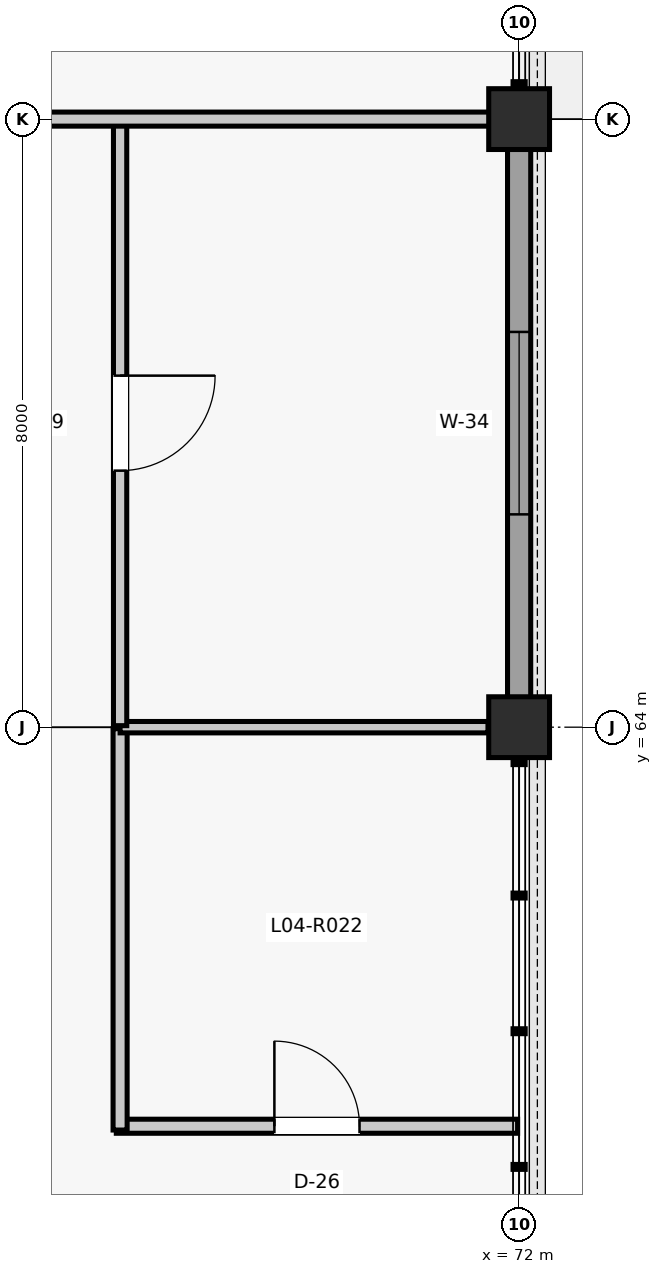
"""IFC4 building model, lengths in metres.
Left out: names, types, materials, properties, quantities, classifications, styles, units other than length and angle.
Written with IfcOpenShell. Run it as: python <this file> out.ifc"""

import sys

from ifc_helpers import new_model, si_unit, direction, frame, frame_2d, origin, origin_2d, place, context, subcontext, project, spatial, rectangle, extrude, element, fill, save


model = new_model("IFC4")
c1 = context("Model", 3, precision=1e-05, world=origin(), true_north=direction((0.0, 1.0)))
c2 = subcontext(c1, "Body", "Model", "MODEL_VIEW")
j1 = project(units=[si_unit("LENGTHUNIT", "METRE"), si_unit("PLANEANGLEUNIT", "RADIAN")], contexts=[c1])
p1 = place(None, origin())
s1 = spatial("IfcSite", under=j1, at=p1, CompositionType="ELEMENT")
p2 = place(p1, origin())
s2 = spatial("IfcBuilding", under=s1, at=p2, CompositionType="ELEMENT")
p3 = place(p2, frame((0.0, 0.0, 17.82)))
s3 = spatial("IfcBuildingStorey", under=s2, at=p3, CompositionType="ELEMENT", Elevation=17.82)
for number, where, z_axis, x_axis in (
    (1, (72.0, 64.0, 0.0), (0.0, 0.0, 1.0), (1.0, 0.0, 0.0)),
    (2, (72.0, 72.0, 0.0), (0.0, 0.0, 1.0), (1.0, 0.0, 0.0)),
):
    element("IfcColumn", number, at=place(p3, frame(where, z_axis=z_axis, x_axis=x_axis)), inside=s3, PredefinedType="COLUMN", context=c2, shape_type="SweptSolid", body=[
        extrude(rectangle(XDim=0.8, YDim=0.8, at=origin_2d()), origin(), (0.0, 0.0, 1.0), 3.96),
    ])
p4 = place(p3, frame((72.0, 64.385, 0.0), z_axis=(0.0, 0.0, 1.0), x_axis=(0.0, 1.0, 0.0)))
e3 = element("IfcWall", 3, at=p4, inside=s3, PredefinedType="SOLIDWALL", context=c2, shape_type="SweptSolid", body=[
    extrude(rectangle(XDim=7.23, YDim=0.305, at=frame_2d((3.615, 0.0))), origin(), (0.0, 0.0, 1.0), 3.002),
])
p5 = place(p4, frame((2.415, 0.0, 0.9)))
e4 = element("IfcOpeningElement", 4, at=p5, cuts=e3, PredefinedType="OPENING", context=c2, shape_type="SweptSolid", body=[
    extrude(rectangle(XDim=2.4, YDim=1.902, at=frame_2d((1.2, 0.951))), frame((0.0, 0.162, 0.0), z_axis=(0.0, -1.0, 0.0), x_axis=(1.0, 0.0, 0.0)), (0.0, 0.0, 1.0), 0.325),
])
p6 = place(p3, frame((66.7, 58.75, 0.0), z_axis=(0.0, 0.0, 1.0), x_axis=(1.0, 0.0, 0.0)))
e5 = element("IfcWall", 5, at=p6, inside=s3, PredefinedType="PARTITIONING", context=c2, shape_type="SweptSolid", body=[
    extrude(rectangle(XDim=5.28, YDim=0.185, at=frame_2d((2.64, 0.0))), origin(), (0.0, 0.0, 1.0), 2.995),
])
p7 = place(p6, frame((2.08, 0.0, 0.0)))
e6 = element("IfcOpeningElement", 6, at=p7, cuts=e5, PredefinedType="OPENING", context=c2, shape_type="SweptSolid", body=[
    extrude(rectangle(XDim=1.12, YDim=2.22, at=frame_2d((0.56, 1.11))), frame((0.0, 0.103, 0.0), z_axis=(0.0, -1.0, 0.0), x_axis=(1.0, 0.0, 0.0)), (0.0, 0.0, 1.0), 0.205),
])
p8 = place(p3, frame((66.75, 58.7, 0.0), z_axis=(0.0, 0.0, 1.0), x_axis=(0.0, 1.0, 0.0)))
e7 = element("IfcWall", 7, at=p8, inside=s3, PredefinedType="PARTITIONING", context=c2, shape_type="SweptSolid", body=[
    extrude(rectangle(XDim=5.28, YDim=0.185, at=frame_2d((2.64, 0.0))), origin(), (0.0, 0.0, 1.0), 3.232),
])
p9 = place(p3, frame((66.75, 64.0, 0.0), z_axis=(0.0, 0.0, 1.0), x_axis=(1.0, 0.0, 0.0)))
e8 = element("IfcWall", 8, at=p9, inside=s3, PredefinedType="PARTITIONING", context=c2, shape_type="SweptSolid", body=[
    extrude(rectangle(XDim=4.84, YDim=0.15, at=frame_2d((2.42, 0.0))), origin(), (0.0, 0.0, 1.0), 3.232),
])
p10 = place(p3, frame((66.75, 64.02, 0.0), z_axis=(0.0, 0.0, 1.0), x_axis=(0.0, 1.0, 0.0)))
e9 = element("IfcWall", 9, at=p10, inside=s3, PredefinedType="PARTITIONING", context=c2, shape_type="SweptSolid", body=[
    extrude(rectangle(XDim=7.96, YDim=0.175, at=frame_2d((3.98, 0.0))), origin(), (0.0, 0.0, 1.0), 3.232),
])
p11 = place(p10, frame((3.355, 0.0, 0.0)))
e10 = element("IfcOpeningElement", 10, at=p11, cuts=e9, PredefinedType="OPENING", context=c2, shape_type="SweptSolid", body=[
    extrude(rectangle(XDim=1.25, YDim=2.18, at=frame_2d((0.625, 1.09))), frame((0.0, 0.097, 0.0), z_axis=(0.0, -1.0, 0.0), x_axis=(1.0, 0.0, 0.0)), (0.0, 0.0, 1.0), 0.195),
])
p12 = place(p3, frame((64.265, 72.0, 0.0), z_axis=(0.0, 0.0, 1.0), x_axis=(1.0, 0.0, 0.0)))
e11 = element("IfcWall", 11, at=p12, inside=s3, PredefinedType="PARTITIONING", context=c2, shape_type="SweptSolid", body=[
    extrude(rectangle(XDim=7.345, YDim=0.185, at=frame_2d((3.673, 0.0))), origin(), (0.0, 0.0, 1.0), 3.238),
])
p13 = place(p12, frame((0.52, 0.0, 0.0)))
e12 = element("IfcOpeningElement", 12, at=p13, cuts=e11, PredefinedType="OPENING", context=c2, shape_type="SweptSolid", body=[
    extrude(rectangle(XDim=0.94, YDim=2.12, at=frame_2d((0.47, 1.06))), frame((0.0, 0.103, 0.0), z_axis=(0.0, -1.0, 0.0), x_axis=(1.0, 0.0, 0.0)), (0.0, 0.0, 1.0), 0.205),
])
p14 = place(p5, origin())
e13 = element("IfcWindow", 13, at=p14, inside=s3, PartitioningType="SINGLE_PANEL", PredefinedType="WINDOW", context=c2, shape_type="SweptSolid", body=[
    extrude(rectangle(XDim=2.4, YDim=1.902, at=frame_2d((1.2, 0.951))), frame((0.0, 0.03, 0.0), z_axis=(0.0, -1.0, 0.0), x_axis=(1.0, 0.0, 0.0)), (0.0, 0.0, 1.0), 0.06),
])
fill(e4, e13)
p15 = place(p7, origin())
e14 = element("IfcDoor", 14, at=p15, inside=s3, OperationType="SINGLE_SWING_LEFT", PredefinedType="DOOR", context=c2, shape_type="SweptSolid", body=[
    extrude(rectangle(XDim=1.12, YDim=2.22, at=frame_2d((0.56, 1.11))), frame((0.0, 0.025, 0.0), z_axis=(0.0, -1.0, 0.0), x_axis=(1.0, 0.0, 0.0)), (0.0, 0.0, 1.0), 0.05),
])
fill(e6, e14)
p16 = place(p11, frame((1.25, 0.0, 0.0), z_axis=(0.0, 0.0, 1.0), x_axis=(-1.0, 0.0, 0.0)))
e15 = element("IfcDoor", 15, at=p16, inside=s3, OperationType="SINGLE_SWING_RIGHT", PredefinedType="DOOR", context=c2, shape_type="SweptSolid", body=[
    extrude(rectangle(XDim=1.25, YDim=2.18, at=frame_2d((0.625, 1.09))), frame((0.0, 0.025, 0.0), z_axis=(0.0, -1.0, 0.0), x_axis=(1.0, 0.0, 0.0)), (0.0, 0.0, 1.0), 0.05),
])
fill(e10, e15)
save(model, sys.argv[1])
